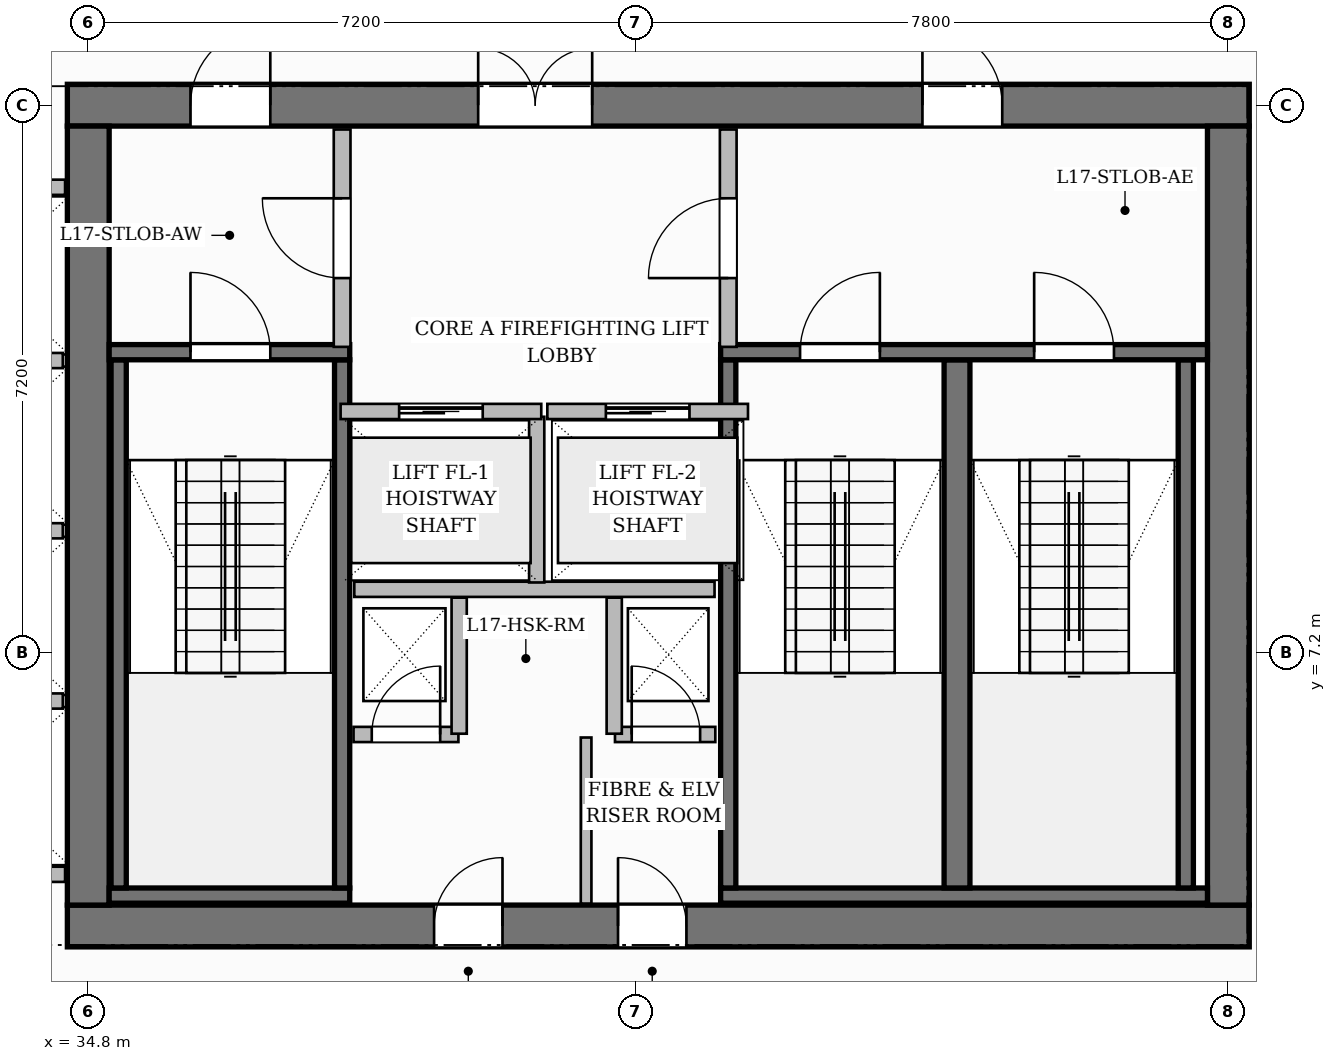
"""IFC4 building model, lengths in metres.
Left out: names, types, materials, properties, quantities, classifications, styles, units other than length and angle.
Written with IfcOpenShell. Run it as: python <this file> out.ifc"""

import sys

from ifc_helpers import new_model, si_unit, direction, frame, frame_2d, origin, place, context, subcontext, project, spatial, rectangle, extrude, source, transform, mapped, element, fill, save


model = new_model("IFC4")
c1 = context("Model", 3, precision=1e-05, world=origin(), true_north=direction((0.0, 1.0)))
c2 = subcontext(c1, "Body", "Model", "MODEL_VIEW")
j1 = project(units=[si_unit("LENGTHUNIT", "METRE"), si_unit("PLANEANGLEUNIT", "RADIAN")], contexts=[c1])
p1 = place(None, origin())
s1 = spatial("IfcSite", under=j1, at=p1, CompositionType="ELEMENT")
p2 = place(p1, origin())
s2 = spatial("IfcBuilding", under=s1, at=p2, CompositionType="ELEMENT")
p3 = place(p2, frame((0.0, 0.0, 73.1)))
s3 = spatial("IfcBuildingStorey", under=s2, at=p3, CompositionType="ELEMENT", Elevation=73.1)
p4 = place(p3, frame((34.525, 3.6, 0.0), z_axis=(0.0, 0.0, 1.0), x_axis=(1.0, 0.0, 0.0)))
e1 = element("IfcWall", 1, at=p4, inside=s3, PredefinedType="SHEAR", context=c2, shape_type="SweptSolid", body=[
    extrude(rectangle(XDim=15.55, YDim=0.55, at=frame_2d((7.775, 0.0))), origin(), (0.0, 0.0, 1.0), 3.7),
])
p5 = place(p4, frame((4.825, 0.0, 0.0)))
e2 = element("IfcOpeningElement", 2, at=p5, cuts=e1, PredefinedType="OPENING", context=c2, shape_type="SweptSolid", body=[
    extrude(rectangle(XDim=0.9, YDim=2.1, at=frame_2d((0.45, 1.05))), frame((0.0, 0.285, 0.0), z_axis=(0.0, -1.0, 0.0), x_axis=(1.0, 0.0, 0.0)), (0.0, 0.0, 1.0), 0.57),
])
p6 = place(p4, frame((7.245, 0.0, 0.0)))
e3 = element("IfcOpeningElement", 3, at=p6, cuts=e1, PredefinedType="OPENING", context=c2, shape_type="SweptSolid", body=[
    extrude(rectangle(XDim=0.9, YDim=2.1, at=frame_2d((0.45, 1.05))), frame((0.0, 0.285, 0.0), z_axis=(0.0, -1.0, 0.0), x_axis=(1.0, 0.0, 0.0)), (0.0, 0.0, 1.0), 0.57),
])
p7 = place(p3, frame((34.525, 14.4, 0.0), z_axis=(0.0, 0.0, 1.0), x_axis=(1.0, 0.0, 0.0)))
e4 = element("IfcWall", 4, at=p7, inside=s3, PredefinedType="SHEAR", context=c2, shape_type="SweptSolid", body=[
    extrude(rectangle(XDim=15.55, YDim=0.55, at=frame_2d((7.775, 0.0))), origin(), (0.0, 0.0, 1.0), 3.7),
])
p8 = place(p7, frame((5.405, 0.0, 0.0)))
e5 = element("IfcOpeningElement", 5, at=p8, cuts=e4, PredefinedType="OPENING", context=c2, shape_type="SweptSolid", body=[
    extrude(rectangle(XDim=1.5, YDim=2.2, at=frame_2d((0.75, 1.1))), frame((0.0, 0.285, 0.0), z_axis=(0.0, -1.0, 0.0), x_axis=(1.0, 0.0, 0.0)), (0.0, 0.0, 1.0), 0.57),
])
p9 = place(p7, frame((1.62, 0.0, 0.0)))
e6 = element("IfcOpeningElement", 6, at=p9, cuts=e4, PredefinedType="OPENING", context=c2, shape_type="SweptSolid", body=[
    extrude(rectangle(XDim=1.05, YDim=2.15, at=frame_2d((0.525, 1.075))), frame((0.0, 0.285, 0.0), z_axis=(0.0, -1.0, 0.0), x_axis=(1.0, 0.0, 0.0)), (0.0, 0.0, 1.0), 0.57),
])
p10 = place(p7, frame((11.25, 0.0, 0.0)))
e7 = element("IfcOpeningElement", 7, at=p10, cuts=e4, PredefinedType="OPENING", context=c2, shape_type="SweptSolid", body=[
    extrude(rectangle(XDim=1.05, YDim=2.15, at=frame_2d((0.525, 1.075))), frame((0.0, 0.285, 0.0), z_axis=(0.0, -1.0, 0.0), x_axis=(1.0, 0.0, 0.0)), (0.0, 0.0, 1.0), 0.57),
])
for number, where, z_axis, x_axis in (
    (8, (34.8, 3.875, 0.0), (0.0, 0.0, 1.0), (0.0, 1.0, 0.0)),
    (9, (49.8, 3.875, 0.0), (0.0, 0.0, 1.0), (0.0, 1.0, 0.0)),
):
    element("IfcWall", number, at=place(p3, frame(where, z_axis=z_axis, x_axis=x_axis)), inside=s3, PredefinedType="SHEAR", context=c2, shape_type="SweptSolid", body=[
        extrude(rectangle(XDim=10.25, YDim=0.55, at=frame_2d((5.125, 0.0))), origin(), (0.0, 0.0, 1.0), 3.7),
    ])
p11 = place(p3, frame((35.075, 4.0, 0.0), z_axis=(0.0, 0.0, 1.0), x_axis=(1.0, 0.0, 0.0)))
e10 = element("IfcWall", 10, at=p11, inside=s3, PredefinedType="SHEAR", context=c2, shape_type="SweptSolid", body=[
    extrude(rectangle(XDim=3.165, YDim=0.2, at=frame_2d((1.583, 0.0))), origin(), (0.0, 0.0, 1.0), 3.7),
])
for number, where, z_axis, x_axis in (
    (11, (35.2, 4.1, 0.0), (0.0, 0.0, 1.0), (0.0, 1.0, 0.0)),
    (12, (38.14, 4.1, 0.0), (0.0, 0.0, 1.0), (0.0, 1.0, 0.0)),
):
    element("IfcWall", number, at=place(p3, frame(where, z_axis=z_axis, x_axis=x_axis)), inside=s3, PredefinedType="SHEAR", context=c2, shape_type="SweptSolid", body=[
        extrude(rectangle(XDim=6.95, YDim=0.2, at=frame_2d((3.475, 0.0))), origin(), (0.0, 0.0, 1.0), 3.7),
    ])
p12 = place(p3, frame((35.075, 11.15, 0.0), z_axis=(0.0, 0.0, 1.0), x_axis=(1.0, 0.0, 0.0)))
e13 = element("IfcWall", 13, at=p12, inside=s3, PredefinedType="SHEAR", context=c2, shape_type="SweptSolid", body=[
    extrude(rectangle(XDim=3.165, YDim=0.2, at=frame_2d((1.583, 0.0))), origin(), (0.0, 0.0, 1.0), 3.7),
])
p13 = place(p12, frame((1.07, 0.0, 0.0)))
e14 = element("IfcOpeningElement", 14, at=p13, cuts=e13, PredefinedType="OPENING", context=c2, shape_type="SweptSolid", body=[
    extrude(rectangle(XDim=1.05, YDim=2.2, at=frame_2d((0.525, 1.1))), frame((0.0, 0.11, 0.0), z_axis=(0.0, -1.0, 0.0), x_axis=(1.0, 0.0, 0.0)), (0.0, 0.0, 1.0), 0.22),
])
p14 = place(p3, frame((43.12, 4.0, 0.0), z_axis=(0.0, 0.0, 1.0), x_axis=(1.0, 0.0, 0.0)))
e15 = element("IfcWall", 15, at=p14, inside=s3, PredefinedType="SHEAR", context=c2, shape_type="SweptSolid", body=[
    extrude(rectangle(XDim=6.405, YDim=0.2, at=frame_2d((3.202, 0.0))), origin(), (0.0, 0.0, 1.0), 3.7),
])
p15 = place(p3, frame((43.22, 4.1, 0.0), z_axis=(0.0, 0.0, 1.0), x_axis=(0.0, 1.0, 0.0)))
e16 = element("IfcWall", 16, at=p15, inside=s3, PredefinedType="SHEAR", context=c2, shape_type="SweptSolid", body=[
    extrude(rectangle(XDim=6.95, YDim=0.2, at=frame_2d((3.475, 0.0))), origin(), (0.0, 0.0, 1.0), 3.7),
])
p16 = place(p3, frame((46.23, 4.1, 0.0), z_axis=(0.0, 0.0, 1.0), x_axis=(0.0, 1.0, 0.0)))
e17 = element("IfcWall", 17, at=p16, inside=s3, PredefinedType="SHEAR", context=c2, shape_type="SweptSolid", body=[
    extrude(rectangle(XDim=6.95, YDim=0.34, at=frame_2d((3.475, 0.0))), origin(), (0.0, 0.0, 1.0), 3.7),
])
p17 = place(p3, frame((49.24, 4.1, 0.0), z_axis=(0.0, 0.0, 1.0), x_axis=(0.0, 1.0, 0.0)))
e18 = element("IfcWall", 18, at=p17, inside=s3, PredefinedType="SHEAR", context=c2, shape_type="SweptSolid", body=[
    extrude(rectangle(XDim=6.95, YDim=0.2, at=frame_2d((3.475, 0.0))), origin(), (0.0, 0.0, 1.0), 3.7),
])
p18 = place(p3, frame((43.12, 11.15, 0.0), z_axis=(0.0, 0.0, 1.0), x_axis=(1.0, 0.0, 0.0)))
e19 = element("IfcWall", 19, at=p18, inside=s3, PredefinedType="SHEAR", context=c2, shape_type="SweptSolid", body=[
    extrude(rectangle(XDim=6.405, YDim=0.2, at=frame_2d((3.202, 0.0))), origin(), (0.0, 0.0, 1.0), 3.7),
])
p19 = place(p18, frame((1.045, 0.0, 0.0)))
e20 = element("IfcOpeningElement", 20, at=p19, cuts=e19, PredefinedType="OPENING", context=c2, shape_type="SweptSolid", body=[
    extrude(rectangle(XDim=1.05, YDim=2.2, at=frame_2d((0.525, 1.1))), frame((0.0, 0.11, 0.0), z_axis=(0.0, -1.0, 0.0), x_axis=(1.0, 0.0, 0.0)), (0.0, 0.0, 1.0), 0.22),
])
p20 = place(p18, frame((4.125, 0.0, 0.0)))
e21 = element("IfcOpeningElement", 21, at=p20, cuts=e19, PredefinedType="OPENING", context=c2, shape_type="SweptSolid", body=[
    extrude(rectangle(XDim=1.05, YDim=2.2, at=frame_2d((0.525, 1.1))), frame((0.0, 0.11, 0.0), z_axis=(0.0, -1.0, 0.0), x_axis=(1.0, 0.0, 0.0)), (0.0, 0.0, 1.0), 0.22),
])
p21 = place(p3, frame((38.3, 8.03, 0.0), z_axis=(0.0, 0.0, 1.0), x_axis=(1.0, 0.0, 0.0)))
e22 = element("IfcWall", 22, at=p21, inside=s3, PredefinedType="PARTITIONING", context=c2, shape_type="SweptSolid", body=[
    extrude(rectangle(XDim=4.74, YDim=0.2, at=frame_2d((2.37, 0.0))), origin(), (0.0, 0.0, 1.0), 3.45),
])
p22 = place(p3, frame((40.7, 8.12, 0.0), z_axis=(0.0, 0.0, 1.0), x_axis=(0.0, 1.0, 0.0)))
e23 = element("IfcWall", 23, at=p22, inside=s3, PredefinedType="PARTITIONING", context=c2, shape_type="SweptSolid", body=[
    extrude(rectangle(XDim=2.18, YDim=0.2, at=frame_2d((1.09, 0.0))), origin(), (0.0, 0.0, 1.0), 3.45),
])
p23 = place(p3, frame((38.14, 11.22, 0.0), z_axis=(0.0, 0.0, 1.0), x_axis=(0.0, 1.0, 0.0)))
e24 = element("IfcWall", 24, at=p23, inside=s3, PredefinedType="PARTITIONING", context=c2, shape_type="SweptSolid", body=[
    extrude(rectangle(XDim=2.86, YDim=0.22, at=frame_2d((1.43, 0.0))), origin(), (0.0, 0.0, 1.0), 3.45),
])
p24 = place(p23, frame((0.905, 0.0, 0.0)))
e25 = element("IfcOpeningElement", 25, at=p24, cuts=e24, PredefinedType="OPENING", context=c2, shape_type="SweptSolid", body=[
    extrude(rectangle(XDim=1.05, YDim=2.15, at=frame_2d((0.525, 1.075))), frame((0.0, 0.12, 0.0), z_axis=(0.0, -1.0, 0.0), x_axis=(1.0, 0.0, 0.0)), (0.0, 0.0, 1.0), 0.24),
])
p25 = place(p3, frame((43.22, 11.22, 0.0), z_axis=(0.0, 0.0, 1.0), x_axis=(0.0, 1.0, 0.0)))
e26 = element("IfcWall", 26, at=p25, inside=s3, PredefinedType="PARTITIONING", context=c2, shape_type="SweptSolid", body=[
    extrude(rectangle(XDim=2.86, YDim=0.22, at=frame_2d((1.43, 0.0))), origin(), (0.0, 0.0, 1.0), 3.45),
])
p26 = place(p25, frame((0.905, 0.0, 0.0)))
e27 = element("IfcOpeningElement", 27, at=p26, cuts=e26, PredefinedType="OPENING", context=c2, shape_type="SweptSolid", body=[
    extrude(rectangle(XDim=1.05, YDim=2.15, at=frame_2d((0.525, 1.075))), frame((0.0, 0.12, 0.0), z_axis=(0.0, -1.0, 0.0), x_axis=(1.0, 0.0, 0.0)), (0.0, 0.0, 1.0), 0.24),
])
p27 = place(p3, frame((38.29, 6.12, 0.0), z_axis=(0.0, 0.0, 1.0), x_axis=(1.0, 0.0, 0.0)))
e28 = element("IfcWall", 28, at=p27, inside=s3, PredefinedType="PARTITIONING", context=c2, shape_type="SweptSolid", body=[
    extrude(rectangle(XDim=1.38, YDim=0.2, at=frame_2d((0.69, 0.0))), origin(), (0.0, 0.0, 1.0), 3.45),
])
p28 = place(p27, frame((0.24, 0.0, 0.0)))
e29 = element("IfcOpeningElement", 29, at=p28, cuts=e28, PredefinedType="OPENING", context=c2, shape_type="SweptSolid", body=[
    extrude(rectangle(XDim=0.9, YDim=2.1, at=frame_2d((0.45, 1.05))), frame((0.0, 0.11, 0.0), z_axis=(0.0, -1.0, 0.0), x_axis=(1.0, 0.0, 0.0)), (0.0, 0.0, 1.0), 0.22),
])
p29 = place(p3, frame((39.68, 6.13, 0.0), z_axis=(0.0, 0.0, 1.0), x_axis=(0.0, 1.0, 0.0)))
e30 = element("IfcWall", 30, at=p29, inside=s3, PredefinedType="PARTITIONING", context=c2, shape_type="SweptSolid", body=[
    extrude(rectangle(XDim=1.79, YDim=0.2, at=frame_2d((0.895, 0.0))), origin(), (0.0, 0.0, 1.0), 3.45),
])
p30 = place(p3, frame((41.73, 6.12, 0.0), z_axis=(0.0, 0.0, 1.0), x_axis=(1.0, 0.0, 0.0)))
e31 = element("IfcWall", 31, at=p30, inside=s3, PredefinedType="PARTITIONING", context=c2, shape_type="SweptSolid", body=[
    extrude(rectangle(XDim=1.32, YDim=0.2, at=frame_2d((0.66, 0.0))), origin(), (0.0, 0.0, 1.0), 3.45),
])
p31 = place(p30, frame((0.22, 0.0, 0.0)))
e32 = element("IfcOpeningElement", 32, at=p31, cuts=e31, PredefinedType="OPENING", context=c2, shape_type="SweptSolid", body=[
    extrude(rectangle(XDim=0.9, YDim=2.1, at=frame_2d((0.45, 1.05))), frame((0.0, 0.11, 0.0), z_axis=(0.0, -1.0, 0.0), x_axis=(1.0, 0.0, 0.0)), (0.0, 0.0, 1.0), 0.22),
])
p32 = place(p3, frame((41.72, 6.13, 0.0), z_axis=(0.0, 0.0, 1.0), x_axis=(0.0, 1.0, 0.0)))
e33 = element("IfcWall", 33, at=p32, inside=s3, PredefinedType="PARTITIONING", context=c2, shape_type="SweptSolid", body=[
    extrude(rectangle(XDim=1.79, YDim=0.2, at=frame_2d((0.895, 0.0))), origin(), (0.0, 0.0, 1.0), 3.45),
])
p33 = place(p3, frame((41.35, 3.895, 0.0), z_axis=(0.0, 0.0, 1.0), x_axis=(0.0, 1.0, 0.0)))
e34 = element("IfcWall", 34, at=p33, inside=s3, PredefinedType="PARTITIONING", context=c2, shape_type="SweptSolid", body=[
    extrude(rectangle(XDim=2.185, YDim=0.14, at=frame_2d((1.093, 0.0))), origin(), (0.0, 0.0, 1.0), 3.45),
])
for number, where, z_axis, x_axis in (
    (35, (32.16, 4.28, 0.0), (0.0, 0.0, 1.0), (1.0, 0.0, 0.0)),
    (36, (32.16, 13.32, 0.0), (0.0, 0.0, 1.0), (1.0, 0.0, 0.0)),
):
    element("IfcWall", number, at=place(p3, frame(where, z_axis=z_axis, x_axis=x_axis)), inside=s3, PredefinedType="PARTITIONING", context=c2, shape_type="SweptSolid", body=[
        extrude(rectangle(XDim=2.335, YDim=0.2, at=frame_2d((1.167, 0.0))), origin(), (0.0, 0.0, 1.0), 3.45),
    ])
for number, where, z_axis, x_axis in (
    (37, (32.26, 6.56, 0.0), (0.0, 0.0, 1.0), (1.0, 0.0, 0.0)),
    (38, (32.26, 8.8, 0.0), (0.0, 0.0, 1.0), (1.0, 0.0, 0.0)),
    (39, (32.26, 11.04, 0.0), (0.0, 0.0, 1.0), (1.0, 0.0, 0.0)),
):
    element("IfcWall", number, at=place(p3, frame(where, z_axis=z_axis, x_axis=x_axis)), inside=s3, PredefinedType="PARTITIONING", context=c2, shape_type="SweptSolid", body=[
        extrude(rectangle(XDim=2.205, YDim=0.2, at=frame_2d((1.103, 0.0))), origin(), (0.0, 0.0, 1.0), 3.45),
    ])
p34 = place(p3, frame((38.12, 10.37, 0.0), z_axis=(0.0, 0.0, 1.0), x_axis=(1.0, 0.0, 0.0)))
e40 = element("IfcWall", 40, at=p34, inside=s3, PredefinedType="PARTITIONING", context=c2, shape_type="SweptSolid", body=[
    extrude(rectangle(XDim=2.64, YDim=0.2, at=frame_2d((1.32, 0.0))), origin(), (0.0, 0.0, 1.0), 3.45),
])
p35 = place(p34, frame((0.77, 0.0, 0.0)))
e41 = element("IfcOpeningElement", 41, at=p35, cuts=e40, PredefinedType="OPENING", context=c2, shape_type="SweptSolid", body=[
    extrude(rectangle(XDim=1.1, YDim=2.2, at=frame_2d((0.55, 1.1))), frame((0.0, 0.11, 0.0), z_axis=(0.0, -1.0, 0.0), x_axis=(1.0, 0.0, 0.0)), (0.0, 0.0, 1.0), 0.22),
])
p36 = place(p3, frame((40.84, 10.37, 0.0), z_axis=(0.0, 0.0, 1.0), x_axis=(1.0, 0.0, 0.0)))
e42 = element("IfcWall", 42, at=p36, inside=s3, PredefinedType="PARTITIONING", context=c2, shape_type="SweptSolid", body=[
    extrude(rectangle(XDim=2.64, YDim=0.2, at=frame_2d((1.32, 0.0))), origin(), (0.0, 0.0, 1.0), 3.45),
])
p37 = place(p36, frame((0.77, 0.0, 0.0)))
e43 = element("IfcOpeningElement", 43, at=p37, cuts=e42, PredefinedType="OPENING", context=c2, shape_type="SweptSolid", body=[
    extrude(rectangle(XDim=1.1, YDim=2.2, at=frame_2d((0.55, 1.1))), frame((0.0, 0.11, 0.0), z_axis=(0.0, -1.0, 0.0), x_axis=(1.0, 0.0, 0.0)), (0.0, 0.0, 1.0), 0.22),
])
m1 = source(origin(), c2, "Body", "SweptSolid", [
    extrude(rectangle(XDim=1.05, YDim=2.2, at=frame_2d((0.525, 1.1))), frame((0.0, 0.025, 0.0), z_axis=(0.0, -1.0, 0.0), x_axis=(1.0, 0.0, 0.0)), (0.0, 0.0, 1.0), 0.05),
])
p38 = place(p13, origin())
e44 = element("IfcDoor", 44, at=p38, inside=s3, OperationType="SINGLE_SWING_LEFT", PredefinedType="DOOR", context=c2, shape_type="MappedRepresentation", body=[
    mapped(m1, transform((0.0, 0.0, 0.0), scale=1.0)),
])
fill(e14, e44)
p39 = place(p19, origin())
e45 = element("IfcDoor", 45, at=p39, inside=s3, OperationType="SINGLE_SWING_RIGHT", PredefinedType="DOOR", context=c2, shape_type="MappedRepresentation", body=[
    mapped(m1, transform((0.0, 0.0, 0.0), scale=1.0)),
])
fill(e20, e45)
p40 = place(p20, origin())
e46 = element("IfcDoor", 46, at=p40, inside=s3, OperationType="SINGLE_SWING_LEFT", PredefinedType="DOOR", context=c2, shape_type="MappedRepresentation", body=[
    mapped(m1, transform((0.0, 0.0, 0.0), scale=1.0)),
])
fill(e21, e46)
m2 = source(origin(), c2, "Body", "SweptSolid", [
    extrude(rectangle(XDim=1.05, YDim=2.15, at=frame_2d((0.525, 1.075))), frame((0.0, 0.025, 0.0), z_axis=(0.0, -1.0, 0.0), x_axis=(1.0, 0.0, 0.0)), (0.0, 0.0, 1.0), 0.05),
])
p41 = place(p24, origin())
e47 = element("IfcDoor", 47, at=p41, inside=s3, OperationType="SINGLE_SWING_RIGHT", PredefinedType="DOOR", context=c2, shape_type="MappedRepresentation", body=[
    mapped(m2, transform((0.0, 0.0, 0.0), scale=1.0)),
])
fill(e25, e47)
p42 = place(p26, origin())
e48 = element("IfcDoor", 48, at=p42, inside=s3, OperationType="SINGLE_SWING_LEFT", PredefinedType="DOOR", context=c2, shape_type="MappedRepresentation", body=[
    mapped(m2, transform((0.0, 0.0, 0.0), scale=1.0)),
])
fill(e27, e48)
m3 = source(origin(), c2, "Body", "SweptSolid", [
    extrude(rectangle(XDim=1.5, YDim=2.2, at=frame_2d((0.75, 1.1))), frame((0.0, 0.025, 0.0), z_axis=(0.0, -1.0, 0.0), x_axis=(1.0, 0.0, 0.0)), (0.0, 0.0, 1.0), 0.05),
])
p43 = place(p8, origin())
e49 = element("IfcDoor", 49, at=p43, inside=s3, OperationType="DOUBLE_DOOR_SINGLE_SWING", PredefinedType="DOOR", context=c2, shape_type="MappedRepresentation", body=[
    mapped(m3, transform((0.0, 0.0, 0.0), scale=1.0)),
])
fill(e5, e49)
p44 = place(p9, origin())
e50 = element("IfcDoor", 50, at=p44, inside=s3, OperationType="SINGLE_SWING_RIGHT", PredefinedType="DOOR", context=c2, shape_type="MappedRepresentation", body=[
    mapped(m2, transform((0.0, 0.0, 0.0), scale=1.0)),
])
fill(e6, e50)
p45 = place(p10, origin())
e51 = element("IfcDoor", 51, at=p45, inside=s3, OperationType="SINGLE_SWING_LEFT", PredefinedType="DOOR", context=c2, shape_type="MappedRepresentation", body=[
    mapped(m2, transform((0.0, 0.0, 0.0), scale=1.0)),
])
fill(e7, e51)
m4 = source(origin(), c2, "Body", "SweptSolid", [
    extrude(rectangle(XDim=0.9, YDim=2.1, at=frame_2d((0.45, 1.05))), frame((0.0, 0.025, 0.0), z_axis=(0.0, -1.0, 0.0), x_axis=(1.0, 0.0, 0.0)), (0.0, 0.0, 1.0), 0.05),
])
p46 = place(p28, origin())
e52 = element("IfcDoor", 52, at=p46, inside=s3, OperationType="SINGLE_SWING_RIGHT", PredefinedType="DOOR", context=c2, shape_type="MappedRepresentation", body=[
    mapped(m4, transform((0.0, 0.0, 0.0), scale=1.0)),
])
fill(e29, e52)
p47 = place(p31, origin())
e53 = element("IfcDoor", 53, at=p47, inside=s3, OperationType="SINGLE_SWING_LEFT", PredefinedType="DOOR", context=c2, shape_type="MappedRepresentation", body=[
    mapped(m4, transform((0.0, 0.0, 0.0), scale=1.0)),
])
fill(e32, e53)
p48 = place(p5, origin())
e54 = element("IfcDoor", 54, at=p48, inside=s3, OperationType="SINGLE_SWING_RIGHT", PredefinedType="DOOR", context=c2, shape_type="MappedRepresentation", body=[
    mapped(m4, transform((0.0, 0.0, 0.0), scale=1.0)),
])
fill(e2, e54)
p49 = place(p6, origin())
e55 = element("IfcDoor", 55, at=p49, inside=s3, OperationType="SINGLE_SWING_LEFT", PredefinedType="DOOR", context=c2, shape_type="MappedRepresentation", body=[
    mapped(m4, transform((0.0, 0.0, 0.0), scale=1.0)),
])
fill(e3, e55)
m5 = source(origin(), c2, "Body", "SweptSolid", [
    extrude(rectangle(XDim=1.1, YDim=2.2, at=frame_2d((0.55, 1.1))), frame((0.0, 0.025, 0.0), z_axis=(0.0, -1.0, 0.0), x_axis=(1.0, 0.0, 0.0)), (0.0, 0.0, 1.0), 0.05),
])
p50 = place(p35, origin())
e56 = element("IfcDoor", 56, at=p50, inside=s3, OperationType="SLIDING_TO_LEFT", PredefinedType="DOOR", context=c2, shape_type="MappedRepresentation", body=[
    mapped(m5, transform((0.0, 0.0, 0.0), scale=1.0)),
])
fill(e41, e56)
p51 = place(p37, origin())
e57 = element("IfcDoor", 57, at=p51, inside=s3, OperationType="SLIDING_TO_LEFT", PredefinedType="DOOR", context=c2, shape_type="MappedRepresentation", body=[
    mapped(m5, transform((0.0, 0.0, 0.0), scale=1.0)),
])
fill(e43, e57)
save(model, sys.argv[1])
